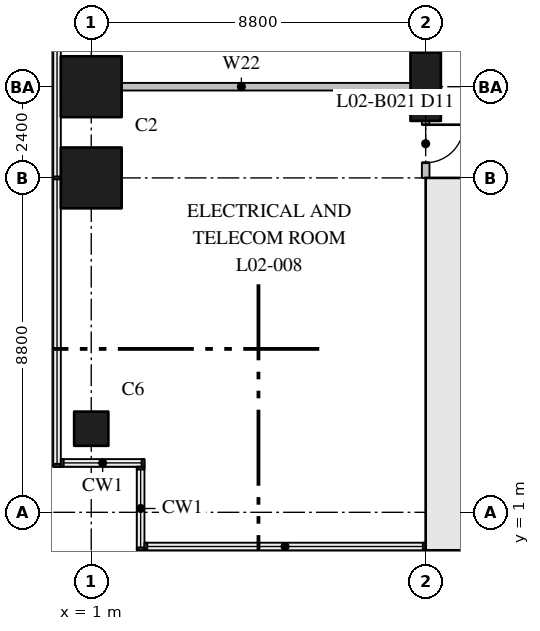
"""IFC4 building model, lengths in metres.
Left out: names, types, materials, properties, quantities, classifications, styles, units other than length and angle.
Written with IfcOpenShell. Run it as: python <this file> out.ifc"""

import sys

from ifc_helpers import new_model, si_unit, direction, frame, frame_2d, origin, origin_2d, place, context, subcontext, project, spatial, rectangle, extrude, element, fill, save


model = new_model("IFC4")
c1 = context("Model", 3, precision=1e-05, world=origin(), true_north=direction((0.0, 1.0)))
c2 = subcontext(c1, "Body", "Model", "MODEL_VIEW")
j1 = project(units=[si_unit("LENGTHUNIT", "METRE"), si_unit("PLANEANGLEUNIT", "RADIAN")], contexts=[c1])
p1 = place(None, origin())
s1 = spatial("IfcSite", under=j1, at=p1, CompositionType="ELEMENT")
p2 = place(p1, origin())
s2 = spatial("IfcBuilding", under=s1, at=p2, CompositionType="ELEMENT")
p3 = place(p2, frame((0.0, 0.0, 13.0)))
s3 = spatial("IfcBuildingStorey", under=s2, at=p3, CompositionType="ELEMENT", Elevation=13.0)
p4 = place(p3, frame((1.0, 3.2, 0.0), z_axis=(0.0, 0.0, 1.0), x_axis=(1.0, 0.0, 0.0)))
e1 = element("IfcColumn", 1, at=p4, inside=s3, PredefinedType="COLUMN", context=c2, shape_type="SweptSolid", body=[
    extrude(rectangle(XDim=0.9, YDim=0.9, at=origin_2d()), origin(), (0.0, 0.0, 1.0), 5.0),
])
for number, where, z_axis, x_axis in (
    (2, (1.0, 9.8, 0.0), (0.0, 0.0, 1.0), (1.0, 0.0, 0.0)),
    (3, (1.0, 12.2, 0.0), (0.0, 0.0, 1.0), (1.0, 0.0, 0.0)),
):
    element("IfcColumn", number, at=place(p3, frame(where, z_axis=z_axis, x_axis=x_axis)), inside=s3, PredefinedType="COLUMN", context=c2, shape_type="SweptSolid", body=[
        extrude(rectangle(XDim=1.6, YDim=1.6, at=origin_2d()), origin(), (0.0, 0.0, 1.0), 5.0),
    ])
p5 = place(p3, frame((9.8, 12.2, 0.0), z_axis=(0.0, 0.0, 1.0), x_axis=(0.0, 1.0, 0.0)))
e4 = element("IfcColumn", 4, at=p5, inside=s3, PredefinedType="COLUMN", context=c2, shape_type="SweptSolid", body=[
    extrude(rectangle(XDim=1.8, YDim=0.8, at=origin_2d()), origin(), (0.0, 0.0, 1.0), 5.0),
])
p6 = place(p3, frame((9.8, 0.6, 0.0), z_axis=(0.0, 0.0, 1.0), x_axis=(1.0, 0.0, 0.0)))
e5 = element("IfcWall", 5, at=p6, inside=s3, PredefinedType="SHEAR", context=c2, shape_type="SweptSolid", body=[
    extrude(rectangle(XDim=35.2, YDim=1.2, at=frame_2d((17.6, 0.0))), origin(), (0.0, 0.0, 1.0), 5.0),
])
p7 = place(p3, frame((10.4, 1.2, 0.0), z_axis=(0.0, 0.0, 1.0), x_axis=(0.0, 1.0, 0.0)))
e6 = element("IfcWall", 6, at=p7, inside=s3, PredefinedType="SHEAR", context=c2, shape_type="SweptSolid", body=[
    extrude(rectangle(XDim=8.6, YDim=1.2, at=frame_2d((4.3, 0.0))), origin(), (0.0, 0.0, 1.0), 5.0),
])
p8 = place(p3, frame((9.8, 9.6, 0.0), z_axis=(0.0, 0.0, 1.0), x_axis=(1.0, 0.0, 0.0)))
e7 = element("IfcWall", 7, at=p8, inside=s3, PredefinedType="SHEAR", context=c2, shape_type="SweptSolid", body=[
    extrude(rectangle(XDim=4.3, YDim=0.4, at=frame_2d((2.15, 0.0))), origin(), (0.0, 0.0, 1.0), 5.0),
])
p9 = place(p8, frame((2.05, 0.0, 0.0)))
e8 = element("IfcOpeningElement", 8, at=p9, cuts=e7, PredefinedType="OPENING", context=c2, shape_type="SweptSolid", body=[
    extrude(rectangle(XDim=1.2, YDim=2.1, at=frame_2d((0.6, 1.05))), frame((0.0, 0.21, 0.0), z_axis=(0.0, -1.0, 0.0), x_axis=(1.0, 0.0, 0.0)), (0.0, 0.0, 1.0), 0.42),
])
p10 = place(p3, frame((0.2, 12.2, 0.0), z_axis=(0.0, 0.0, 1.0), x_axis=(1.0, 0.0, 0.0)))
e9 = element("IfcWall", 9, at=p10, inside=s3, PredefinedType="PARTITIONING", context=c2, shape_type="SweptSolid", body=[
    extrude(rectangle(XDim=9.5, YDim=0.2, at=frame_2d((4.75, 0.0))), origin(), (0.0, 0.0, 1.0), 4.6),
])
p11 = place(p3, frame((9.8, 9.8, 0.0), z_axis=(0.0, 0.0, 1.0), x_axis=(0.0, 1.0, 0.0)))
e10 = element("IfcWall", 10, at=p11, inside=s3, PredefinedType="PARTITIONING", context=c2, shape_type="SweptSolid", body=[
    extrude(rectangle(XDim=48.0, YDim=0.2, at=frame_2d((24.0, 0.0))), origin(), (0.0, 0.0, 1.0), 4.6),
])
p12 = place(p11, frame((5.73, 0.0, 0.0)))
e11 = element("IfcOpeningElement", 11, at=p12, cuts=e10, PredefinedType="OPENING", context=c2, shape_type="SweptSolid", body=[
    extrude(rectangle(XDim=1.0, YDim=2.1, at=frame_2d((0.5, 1.05))), frame((0.0, 0.11, 0.0), z_axis=(0.0, -1.0, 0.0), x_axis=(1.0, 0.0, 0.0)), (0.0, 0.0, 1.0), 0.22),
])
p13 = place(p11, frame((14.74, 0.0, 0.0)))
e12 = element("IfcOpeningElement", 12, at=p13, cuts=e10, PredefinedType="OPENING", context=c2, shape_type="SweptSolid", body=[
    extrude(rectangle(XDim=1.0, YDim=2.1, at=frame_2d((0.5, 1.05))), frame((0.0, 0.11, 0.0), z_axis=(0.0, -1.0, 0.0), x_axis=(1.0, 0.0, 0.0)), (0.0, 0.0, 1.0), 0.22),
])
p14 = place(p11, frame((23.075, 0.0, 0.0)))
e13 = element("IfcOpeningElement", 13, at=p14, cuts=e10, PredefinedType="OPENING", context=c2, shape_type="SweptSolid", body=[
    extrude(rectangle(XDim=1.0, YDim=2.1, at=frame_2d((0.5, 1.05))), frame((0.0, 0.11, 0.0), z_axis=(0.0, -1.0, 0.0), x_axis=(1.0, 0.0, 0.0)), (0.0, 0.0, 1.0), 0.22),
])
p15 = place(p11, frame((29.985, 0.0, 0.0)))
e14 = element("IfcOpeningElement", 14, at=p15, cuts=e10, PredefinedType="OPENING", context=c2, shape_type="SweptSolid", body=[
    extrude(rectangle(XDim=1.0, YDim=2.1, at=frame_2d((0.5, 1.05))), frame((0.0, 0.11, 0.0), z_axis=(0.0, -1.0, 0.0), x_axis=(1.0, 0.0, 0.0)), (0.0, 0.0, 1.0), 0.22),
])
p16 = place(p11, frame((36.668, 0.0, 0.0)))
e15 = element("IfcOpeningElement", 15, at=p16, cuts=e10, PredefinedType="OPENING", context=c2, shape_type="SweptSolid", body=[
    extrude(rectangle(XDim=1.0, YDim=2.1, at=frame_2d((0.5, 1.05))), frame((0.0, 0.11, 0.0), z_axis=(0.0, -1.0, 0.0), x_axis=(1.0, 0.0, 0.0)), (0.0, 0.0, 1.0), 0.22),
])
p17 = place(p11, frame((44.967, 0.0, 0.0)))
e16 = element("IfcOpeningElement", 16, at=p17, cuts=e10, PredefinedType="OPENING", context=c2, shape_type="SweptSolid", body=[
    extrude(rectangle(XDim=1.0, YDim=2.1, at=frame_2d((0.5, 1.05))), frame((0.0, 0.11, 0.0), z_axis=(0.0, -1.0, 0.0), x_axis=(1.0, 0.0, 0.0)), (0.0, 0.0, 1.0), 0.22),
])
p18 = place(p11, frame((0.4, 0.0, 0.0)))
e17 = element("IfcOpeningElement", 17, at=p18, cuts=e10, PredefinedType="OPENING", context=c2, shape_type="SweptSolid", body=[
    extrude(rectangle(XDim=1.0, YDim=2.1, at=frame_2d((0.5, 1.05))), frame((0.0, 0.11, 0.0), z_axis=(0.0, -1.0, 0.0), x_axis=(1.0, 0.0, 0.0)), (0.0, 0.0, 1.0), 0.22),
])
p19 = place(p18, frame((1.0, 0.0, 0.0), z_axis=(0.0, 0.0, 1.0), x_axis=(-1.0, 0.0, 0.0)))
e18 = element("IfcDoor", 18, at=p19, inside=s3, OperationType="SINGLE_SWING_RIGHT", PredefinedType="DOOR", context=c2, shape_type="SweptSolid", body=[
    extrude(rectangle(XDim=1.0, YDim=2.1, at=frame_2d((0.5, 1.05))), frame((0.0, 0.025, 0.0), z_axis=(0.0, -1.0, 0.0), x_axis=(1.0, 0.0, 0.0)), (0.0, 0.0, 1.0), 0.05),
])
fill(e17, e18)
save(model, sys.argv[1])
